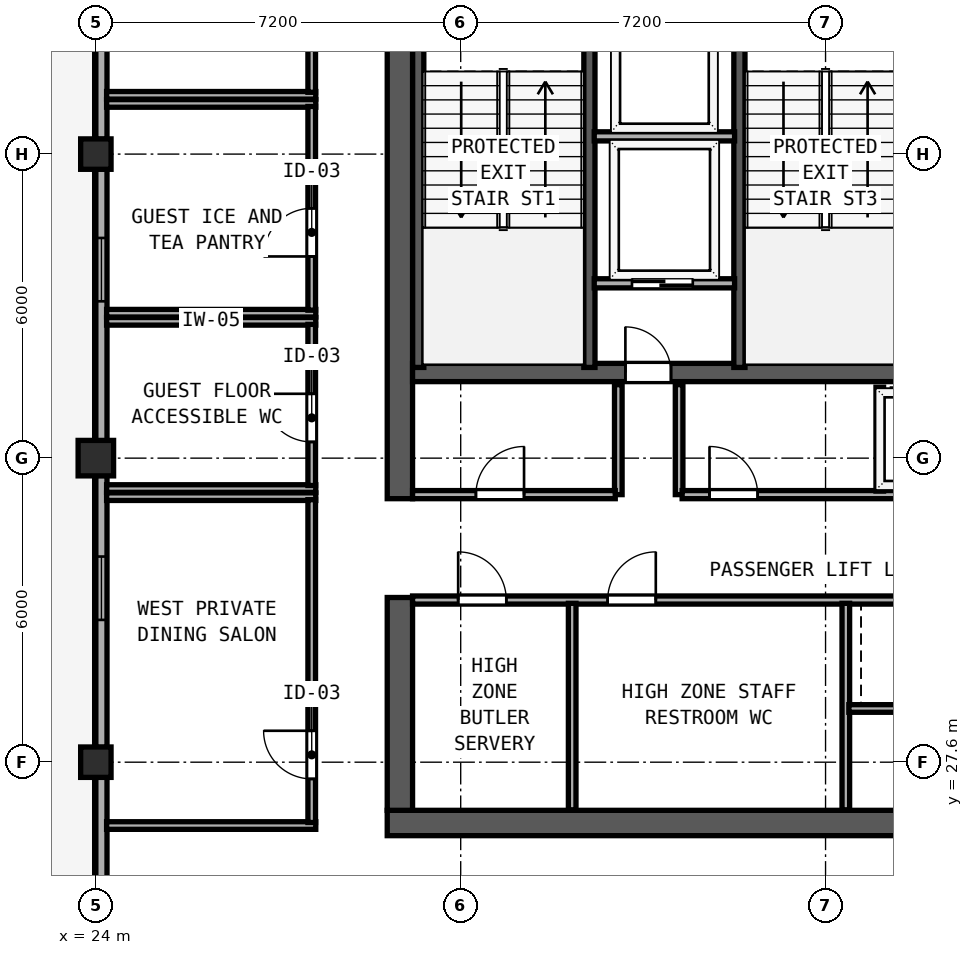
"""IFC4 building model, lengths in metres.
Left out: names, types, materials, properties, quantities, classifications, styles, units other than length and angle.
Written with IfcOpenShell. Run it as: python <this file> out.ifc"""

import sys

from ifc_helpers import new_model, si_unit, direction, frame, frame_2d, origin, origin_2d, place, context, subcontext, project, spatial, rectangle, hollow_rectangle, extrude, element, fill, save


model = new_model("IFC4")
c1 = context("Model", 3, precision=1e-05, world=origin(), true_north=direction((0.0, 1.0)))
c2 = subcontext(c1, "Body", "Model", "MODEL_VIEW")
j1 = project(units=[si_unit("LENGTHUNIT", "METRE"), si_unit("PLANEANGLEUNIT", "RADIAN")], contexts=[c1])
p1 = place(None, origin())
s1 = spatial("IfcSite", under=j1, at=p1, CompositionType="ELEMENT")
p2 = place(p1, origin())
s2 = spatial("IfcBuilding", under=s1, at=p2, CompositionType="ELEMENT")
p3 = place(p2, frame((0.0, 0.0, 282.2)))
s3 = spatial("IfcBuildingStorey", under=s2, at=p3, CompositionType="ELEMENT", Elevation=282.2)
p4 = place(p3, frame((29.75, 26.4, 0.0), z_axis=(0.0, 0.0, 1.0), x_axis=(1.0, 0.0, 0.0)))
e1 = element("IfcWall", 1, at=p4, inside=s3, PredefinedType="SHEAR", context=c2, shape_type="SweptSolid", body=[
    extrude(rectangle(XDim=17.3, YDim=0.5, at=frame_2d((8.65, 0.0))), origin(), (0.0, 0.0, 1.0), 3.72),
])
p5 = place(p3, frame((30.0, 26.65, 0.0), z_axis=(0.0, 0.0, 1.0), x_axis=(0.0, 1.0, 0.0)))
e2 = element("IfcWall", 2, at=p5, inside=s3, PredefinedType="SHEAR", context=c2, shape_type="SweptSolid", body=[
    extrude(rectangle(XDim=4.2, YDim=0.5, at=frame_2d((2.1, 0.0))), origin(), (0.0, 0.0, 1.0), 3.72),
])
p6 = place(p3, frame((30.0, 32.8, 0.0), z_axis=(0.0, 0.0, 1.0), x_axis=(0.0, 1.0, 0.0)))
e3 = element("IfcWall", 3, at=p6, inside=s3, PredefinedType="SHEAR", context=c2, shape_type="SweptSolid", body=[
    extrude(rectangle(XDim=10.15, YDim=0.5, at=frame_2d((5.075, 0.0))), origin(), (0.0, 0.0, 1.0), 3.72),
])
p7 = place(p3, frame((30.25, 35.29, 0.0), z_axis=(0.0, 0.0, 1.0), x_axis=(1.0, 0.0, 0.0)))
e4 = element("IfcWall", 4, at=p7, inside=s3, PredefinedType="SHEAR", context=c2, shape_type="SweptSolid", body=[
    extrude(rectangle(XDim=16.3, YDim=0.36, at=frame_2d((8.15, 0.0))), origin(), (0.0, 0.0, 1.0), 3.72),
])
p8 = place(p7, frame((5.1, 0.0, 0.0), z_axis=(0.0, 0.0, 1.0), x_axis=(-1.0, 0.0, 0.0)))
e5 = element("IfcOpeningElement", 5, at=p8, cuts=e4, PredefinedType="OPENING", context=c2, shape_type="SweptSolid", body=[
    extrude(rectangle(XDim=0.9, YDim=2.1, at=frame_2d((0.45, 1.05))), frame((0.0, 0.19, 0.0), z_axis=(0.0, -1.0, 0.0), x_axis=(1.0, 0.0, 0.0)), (0.0, 0.0, 1.0), 0.38),
])
p9 = place(p7, frame((12.16, 0.0, 0.0), z_axis=(0.0, 0.0, 1.0), x_axis=(-1.0, 0.0, 0.0)))
e6 = element("IfcOpeningElement", 6, at=p9, cuts=e4, PredefinedType="OPENING", context=c2, shape_type="SweptSolid", body=[
    extrude(rectangle(XDim=0.9, YDim=2.1, at=frame_2d((0.45, 1.05))), frame((0.0, 0.19, 0.0), z_axis=(0.0, -1.0, 0.0), x_axis=(1.0, 0.0, 0.0)), (0.0, 0.0, 1.0), 0.38),
])
for number, where, z_axis, x_axis in (
    (7, (30.362, 35.39, 0.0), (0.0, 0.0, 1.0), (0.0, 1.0, 0.0)),
    (8, (33.74, 35.39, 0.0), (0.0, 0.0, 1.0), (0.0, 1.0, 0.0)),
    (9, (36.7, 35.39, 0.0), (0.0, 0.0, 1.0), (0.0, 1.0, 0.0)),
):
    element("IfcWall", number, at=place(p3, frame(where, z_axis=z_axis, x_axis=x_axis)), inside=s3, PredefinedType="SHEAR", context=c2, shape_type="SweptSolid", body=[
        extrude(rectangle(XDim=7.56, YDim=0.22, at=frame_2d((3.78, 0.0))), origin(), (0.0, 0.0, 1.0), 3.72),
    ])
p10 = place(p3, frame((24.0, 33.6, 0.0), z_axis=(0.0, 0.0, 1.0), x_axis=(1.0, 0.0, 0.0)))
e10 = element("IfcColumn", 10, at=p10, inside=s3, PredefinedType="COLUMN", context=c2, shape_type="SweptSolid", body=[
    extrude(hollow_rectangle(XDim=0.7, YDim=0.7, WallThickness=0.026, at=origin_2d()), origin(), (0.0, 0.0, 1.0), 3.9),
])
for number, where, z_axis, x_axis in (
    (11, (24.0, 27.6, 0.0), (0.0, 0.0, 1.0), (1.0, 0.0, 0.0)),
    (12, (24.0, 39.6, 0.0), (0.0, 0.0, 1.0), (1.0, 0.0, 0.0)),
):
    element("IfcColumn", number, at=place(p3, frame(where, z_axis=z_axis, x_axis=x_axis)), inside=s3, PredefinedType="COLUMN", context=c2, shape_type="SweptSolid", body=[
        extrude(hollow_rectangle(XDim=0.6, YDim=0.6, WallThickness=0.024, at=origin_2d()), origin(), (0.0, 0.0, 1.0), 3.9),
    ])
p11 = place(p3, frame((24.11, 45.258, 0.0), z_axis=(0.0, 0.0, 1.0), x_axis=(0.0, -1.0, 0.0)))
e13 = element("IfcWall", 13, at=p11, inside=s3, PredefinedType="SOLIDWALL", context=c2, shape_type="SweptSolid", body=[
    extrude(rectangle(XDim=5.366, YDim=0.22, at=frame_2d((2.683, 0.0))), origin(), (0.0, 0.0, 1.0), 3.365),
])
p12 = place(p11, frame((1.6, 0.0, 0.85)))
e14 = element("IfcOpeningElement", 14, at=p12, cuts=e13, PredefinedType="OPENING", context=c2, shape_type="SweptSolid", body=[
    extrude(rectangle(XDim=1.25, YDim=1.95, at=frame_2d((0.625, 0.975))), frame((0.0, 0.12, 0.0), z_axis=(0.0, -1.0, 0.0), x_axis=(1.0, 0.0, 0.0)), (0.0, 0.0, 1.0), 0.24),
])
p13 = place(p3, frame((24.11, 39.308, 0.0), z_axis=(0.0, 0.0, 1.0), x_axis=(0.0, -1.0, 0.0)))
e15 = element("IfcWall", 15, at=p13, inside=s3, PredefinedType="SOLIDWALL", context=c2, shape_type="SweptSolid", body=[
    extrude(rectangle(XDim=5.366, YDim=0.22, at=frame_2d((2.683, 0.0))), origin(), (0.0, 0.0, 1.0), 3.365),
])
p14 = place(p13, frame((1.363, 0.0, 0.85)))
e16 = element("IfcOpeningElement", 16, at=p14, cuts=e15, PredefinedType="OPENING", context=c2, shape_type="SweptSolid", body=[
    extrude(rectangle(XDim=1.25, YDim=1.95, at=frame_2d((0.625, 0.975))), frame((0.0, 0.12, 0.0), z_axis=(0.0, -1.0, 0.0), x_axis=(1.0, 0.0, 0.0)), (0.0, 0.0, 1.0), 0.24),
])
p15 = place(p3, frame((24.11, 33.258, 0.0), z_axis=(0.0, 0.0, 1.0), x_axis=(0.0, -1.0, 0.0)))
e17 = element("IfcWall", 17, at=p15, inside=s3, PredefinedType="SOLIDWALL", context=c2, shape_type="SweptSolid", body=[
    extrude(rectangle(XDim=5.366, YDim=0.22, at=frame_2d((2.683, 0.0))), origin(), (0.0, 0.0, 1.0), 3.365),
])
p16 = place(p15, frame((1.6, 0.0, 0.85)))
e18 = element("IfcOpeningElement", 18, at=p16, cuts=e17, PredefinedType="OPENING", context=c2, shape_type="SweptSolid", body=[
    extrude(rectangle(XDim=1.25, YDim=1.95, at=frame_2d((0.625, 0.975))), frame((0.0, 0.12, 0.0), z_axis=(0.0, -1.0, 0.0), x_axis=(1.0, 0.0, 0.0)), (0.0, 0.0, 1.0), 0.24),
])
p17 = place(p3, frame((24.11, 27.308, 0.0), z_axis=(0.0, 0.0, 1.0), x_axis=(0.0, -1.0, 0.0)))
e19 = element("IfcWall", 19, at=p17, inside=s3, PredefinedType="SOLIDWALL", context=c2, shape_type="SweptSolid", body=[
    extrude(rectangle(XDim=5.366, YDim=0.22, at=frame_2d((2.683, 0.0))), origin(), (0.0, 0.0, 1.0), 3.365),
])
p18 = place(p17, frame((5.146, 0.0, 0.0), z_axis=(0.0, 0.0, 1.0), x_axis=(-1.0, 0.0, 0.0)))
e20 = element("IfcOpeningElement", 20, at=p18, cuts=e19, PredefinedType="OPENING", context=c2, shape_type="SweptSolid", body=[
    extrude(rectangle(XDim=1.5, YDim=2.2, at=frame_2d((0.75, 1.1))), frame((0.0, 0.12, 0.0), z_axis=(0.0, -1.0, 0.0), x_axis=(1.0, 0.0, 0.0)), (0.0, 0.0, 1.0), 0.24),
])
p19 = place(p3, frame((33.835, 39.95, 0.0), z_axis=(0.0, 0.0, 1.0), x_axis=(1.0, 0.0, 0.0)))
e21 = element("IfcWall", 21, at=p19, inside=s3, PredefinedType="SOLIDWALL", context=c2, shape_type="SweptSolid", body=[
    extrude(rectangle(XDim=2.77, YDim=0.18, at=frame_2d((1.385, 0.0))), origin(), (0.0, 0.0, 1.0), 3.72),
])
p20 = place(p3, frame((33.835, 37.05, 0.0), z_axis=(0.0, 0.0, 1.0), x_axis=(1.0, 0.0, 0.0)))
e22 = element("IfcWall", 22, at=p20, inside=s3, PredefinedType="SOLIDWALL", context=c2, shape_type="SweptSolid", body=[
    extrude(rectangle(XDim=2.77, YDim=0.18, at=frame_2d((1.385, 0.0))), origin(), (0.0, 0.0, 1.0), 3.72),
])
p21 = place(p20, frame((1.945, 0.0, 0.0), z_axis=(0.0, 0.0, 1.0), x_axis=(-1.0, 0.0, 0.0)))
e23 = element("IfcOpeningElement", 23, at=p21, cuts=e22, PredefinedType="OPENING", context=c2, shape_type="SweptSolid", body=[
    extrude(rectangle(XDim=1.2, YDim=2.2, at=frame_2d((0.6, 1.1))), frame((0.0, 0.1, 0.0), z_axis=(0.0, -1.0, 0.0), x_axis=(1.0, 0.0, 0.0)), (0.0, 0.0, 1.0), 0.2),
])
for number, where, z_axis, x_axis in (
    (24, (34.31, 32.88, 0.0), (0.0, 0.0, 1.0), (0.0, 1.0, 0.0)),
    (25, (35.51, 32.88, 0.0), (0.0, 0.0, 1.0), (0.0, 1.0, 0.0)),
):
    element("IfcWall", number, at=place(p3, frame(where, z_axis=z_axis, x_axis=x_axis)), inside=s3, PredefinedType="SOLIDWALL", context=c2, shape_type="SweptSolid", body=[
        extrude(rectangle(XDim=2.17, YDim=0.15, at=frame_2d((1.085, 0.0))), origin(), (0.0, 0.0, 1.0), 3.72),
    ])
p22 = place(p3, frame((30.25, 32.88, 0.0), z_axis=(0.0, 0.0, 1.0), x_axis=(1.0, 0.0, 0.0)))
e26 = element("IfcWall", 26, at=p22, inside=s3, PredefinedType="SOLIDWALL", context=c2, shape_type="SweptSolid", body=[
    extrude(rectangle(XDim=4.0, YDim=0.16, at=frame_2d((2.0, 0.0))), origin(), (0.0, 0.0, 1.0), 3.72),
])
p23 = place(p22, frame((2.2, 0.0, 0.0), z_axis=(0.0, 0.0, 1.0), x_axis=(-1.0, 0.0, 0.0)))
e27 = element("IfcOpeningElement", 27, at=p23, cuts=e26, PredefinedType="OPENING", context=c2, shape_type="SweptSolid", body=[
    extrude(rectangle(XDim=0.95, YDim=2.12, at=frame_2d((0.475, 1.06))), frame((0.0, 0.09, 0.0), z_axis=(0.0, -1.0, 0.0), x_axis=(1.0, 0.0, 0.0)), (0.0, 0.0, 1.0), 0.18),
])
p24 = place(p3, frame((35.57, 32.88, 0.0), z_axis=(0.0, 0.0, 1.0), x_axis=(1.0, 0.0, 0.0)))
e28 = element("IfcWall", 28, at=p24, inside=s3, PredefinedType="SOLIDWALL", context=c2, shape_type="SweptSolid", body=[
    extrude(rectangle(XDim=5.74, YDim=0.16, at=frame_2d((2.87, 0.0))), origin(), (0.0, 0.0, 1.0), 3.72),
])
p25 = place(p24, frame((1.49, 0.0, 0.0), z_axis=(0.0, 0.0, 1.0), x_axis=(-1.0, 0.0, 0.0)))
e29 = element("IfcOpeningElement", 29, at=p25, cuts=e28, PredefinedType="OPENING", context=c2, shape_type="SweptSolid", body=[
    extrude(rectangle(XDim=0.95, YDim=2.12, at=frame_2d((0.475, 1.06))), frame((0.0, 0.09, 0.0), z_axis=(0.0, -1.0, 0.0), x_axis=(1.0, 0.0, 0.0)), (0.0, 0.0, 1.0), 0.18),
])
p26 = place(p24, frame((5.43, 0.0, 0.0), z_axis=(0.0, 0.0, 1.0), x_axis=(-1.0, 0.0, 0.0)))
e30 = element("IfcOpeningElement", 30, at=p26, cuts=e28, PredefinedType="OPENING", context=c2, shape_type="SweptSolid", body=[
    extrude(rectangle(XDim=1.1, YDim=2.2, at=frame_2d((0.55, 1.1))), frame((0.0, 0.09, 0.0), z_axis=(0.0, -1.0, 0.0), x_axis=(1.0, 0.0, 0.0)), (0.0, 0.0, 1.0), 0.18),
])
p27 = place(p3, frame((39.47, 32.95, 0.0), z_axis=(0.0, 0.0, 1.0), x_axis=(0.0, 1.0, 0.0)))
e31 = element("IfcWall", 31, at=p27, inside=s3, PredefinedType="SOLIDWALL", context=c2, shape_type="SweptSolid", body=[
    extrude(rectangle(XDim=2.05, YDim=0.15, at=frame_2d((1.025, 0.0))), origin(), (0.0, 0.0, 1.0), 3.72),
])
p28 = place(p3, frame((30.25, 30.8, 0.0), z_axis=(0.0, 0.0, 1.0), x_axis=(1.0, 0.0, 0.0)))
e32 = element("IfcWall", 32, at=p28, inside=s3, PredefinedType="SOLIDWALL", context=c2, shape_type="SweptSolid", body=[
    extrude(rectangle(XDim=16.3, YDim=0.16, at=frame_2d((8.15, 0.0))), origin(), (0.0, 0.0, 1.0), 3.72),
])
p29 = place(p28, frame((0.9, 0.0, 0.0)))
e33 = element("IfcOpeningElement", 33, at=p29, cuts=e32, PredefinedType="OPENING", context=c2, shape_type="SweptSolid", body=[
    extrude(rectangle(XDim=0.95, YDim=2.12, at=frame_2d((0.475, 1.06))), frame((0.0, 0.09, 0.0), z_axis=(0.0, -1.0, 0.0), x_axis=(1.0, 0.0, 0.0)), (0.0, 0.0, 1.0), 0.18),
])
p30 = place(p28, frame((3.85, 0.0, 0.0)))
e34 = element("IfcOpeningElement", 34, at=p30, cuts=e32, PredefinedType="OPENING", context=c2, shape_type="SweptSolid", body=[
    extrude(rectangle(XDim=0.95, YDim=2.12, at=frame_2d((0.475, 1.06))), frame((0.0, 0.09, 0.0), z_axis=(0.0, -1.0, 0.0), x_axis=(1.0, 0.0, 0.0)), (0.0, 0.0, 1.0), 0.18),
])
p31 = place(p3, frame((38.8, 26.66, 0.0), z_axis=(0.0, 0.0, 1.0), x_axis=(0.0, 1.0, 0.0)))
e35 = element("IfcWall", 35, at=p31, inside=s3, PredefinedType="SOLIDWALL", context=c2, shape_type="SweptSolid", body=[
    extrude(rectangle(XDim=4.075, YDim=0.15, at=frame_2d((2.038, 0.0))), origin(), (0.0, 0.0, 1.0), 3.72),
])
p32 = place(p3, frame((33.4, 26.66, 0.0), z_axis=(0.0, 0.0, 1.0), x_axis=(0.0, 1.0, 0.0)))
e36 = element("IfcWall", 36, at=p32, inside=s3, PredefinedType="PARTITIONING", context=c2, shape_type="SweptSolid", body=[
    extrude(rectangle(XDim=4.075, YDim=0.15, at=frame_2d((2.038, 0.0))), origin(), (0.0, 0.0, 1.0), 3.72),
])
p33 = place(p3, frame((38.86, 28.66, 0.0), z_axis=(0.0, 0.0, 1.0), x_axis=(1.0, 0.0, 0.0)))
e37 = element("IfcWall", 37, at=p33, inside=s3, PredefinedType="PARTITIONING", context=c2, shape_type="SweptSolid", body=[
    extrude(rectangle(XDim=7.69, YDim=0.15, at=frame_2d((3.845, 0.0))), origin(), (0.0, 0.0, 1.0), 3.72),
])
for number, where, z_axis, x_axis in (
    (38, (24.212, 36.3, 0.0), (0.0, 0.0, 1.0), (1.0, 0.0, 0.0)),
    (39, (24.212, 33.0, 0.0), (0.0, 0.0, 1.0), (1.0, 0.0, 0.0)),
):
    element("IfcWall", number, at=place(p3, frame(where, z_axis=z_axis, x_axis=x_axis)), inside=s3, PredefinedType="PARTITIONING", context=c2, shape_type="SweptSolid", body=[
        extrude(rectangle(XDim=4.128, YDim=0.15, at=frame_2d((2.064, 0.0))), origin(), (0.0, 0.0, 1.0), 3.72),
    ])
p34 = place(p3, frame((28.26, 33.06, 0.0), z_axis=(0.0, 0.0, 1.0), x_axis=(0.0, 1.0, 0.0)))
e40 = element("IfcWall", 40, at=p34, inside=s3, PredefinedType="PARTITIONING", context=c2, shape_type="SweptSolid", body=[
    extrude(rectangle(XDim=3.18, YDim=0.15, at=frame_2d((1.59, 0.0))), origin(), (0.0, 0.0, 1.0), 3.72),
])
p35 = place(p34, frame((1.81, 0.0, 0.0), z_axis=(0.0, 0.0, 1.0), x_axis=(-1.0, 0.0, 0.0)))
e41 = element("IfcOpeningElement", 41, at=p35, cuts=e40, PredefinedType="OPENING", context=c2, shape_type="SweptSolid", body=[
    extrude(rectangle(XDim=0.95, YDim=2.12, at=frame_2d((0.475, 1.06))), frame((0.0, 0.085, 0.0), z_axis=(0.0, -1.0, 0.0), x_axis=(1.0, 0.0, 0.0)), (0.0, 0.0, 1.0), 0.17),
])
for number, where, z_axis, x_axis in (
    (42, (24.212, 40.6, 0.0), (0.0, 0.0, 1.0), (1.0, 0.0, 0.0)),
    (43, (24.212, 36.46, 0.0), (0.0, 0.0, 1.0), (1.0, 0.0, 0.0)),
):
    element("IfcWall", number, at=place(p3, frame(where, z_axis=z_axis, x_axis=x_axis)), inside=s3, PredefinedType="PARTITIONING", context=c2, shape_type="SweptSolid", body=[
        extrude(rectangle(XDim=4.128, YDim=0.15, at=frame_2d((2.064, 0.0))), origin(), (0.0, 0.0, 1.0), 3.72),
    ])
p36 = place(p3, frame((28.26, 36.52, 0.0), z_axis=(0.0, 0.0, 1.0), x_axis=(0.0, 1.0, 0.0)))
e44 = element("IfcWall", 44, at=p36, inside=s3, PredefinedType="PARTITIONING", context=c2, shape_type="SweptSolid", body=[
    extrude(rectangle(XDim=4.02, YDim=0.15, at=frame_2d((2.01, 0.0))), origin(), (0.0, 0.0, 1.0), 3.72),
])
p37 = place(p36, frame((2.01, 0.0, 0.0), z_axis=(0.0, 0.0, 1.0), x_axis=(-1.0, 0.0, 0.0)))
e45 = element("IfcOpeningElement", 45, at=p37, cuts=e44, PredefinedType="OPENING", context=c2, shape_type="SweptSolid", body=[
    extrude(rectangle(XDim=0.95, YDim=2.12, at=frame_2d((0.475, 1.06))), frame((0.0, 0.085, 0.0), z_axis=(0.0, -1.0, 0.0), x_axis=(1.0, 0.0, 0.0)), (0.0, 0.0, 1.0), 0.17),
])
p38 = place(p3, frame((24.212, 40.76, 0.0), z_axis=(0.0, 0.0, 1.0), x_axis=(1.0, 0.0, 0.0)))
e46 = element("IfcWall", 46, at=p38, inside=s3, PredefinedType="PARTITIONING", context=c2, shape_type="SweptSolid", body=[
    extrude(rectangle(XDim=4.128, YDim=0.15, at=frame_2d((2.064, 0.0))), origin(), (0.0, 0.0, 1.0), 3.72),
])
p39 = place(p3, frame((28.26, 40.82, 0.0), z_axis=(0.0, 0.0, 1.0), x_axis=(0.0, 1.0, 0.0)))
e47 = element("IfcWall", 47, at=p39, inside=s3, PredefinedType="PARTITIONING", context=c2, shape_type="SweptSolid", body=[
    extrude(rectangle(XDim=6.62, YDim=0.15, at=frame_2d((3.31, 0.0))), origin(), (0.0, 0.0, 1.0), 3.72),
])
p40 = place(p39, frame((2.41, 0.0, 0.0), z_axis=(0.0, 0.0, 1.0), x_axis=(-1.0, 0.0, 0.0)))
e48 = element("IfcOpeningElement", 48, at=p40, cuts=e47, PredefinedType="OPENING", context=c2, shape_type="SweptSolid", body=[
    extrude(rectangle(XDim=0.95, YDim=2.12, at=frame_2d((0.475, 1.06))), frame((0.0, 0.085, 0.0), z_axis=(0.0, -1.0, 0.0), x_axis=(1.0, 0.0, 0.0)), (0.0, 0.0, 1.0), 0.17),
])
for number, where, z_axis, x_axis in (
    (49, (24.212, 32.84, 0.0), (0.0, 0.0, 1.0), (1.0, 0.0, 0.0)),
    (50, (24.212, 26.35, 0.0), (0.0, 0.0, 1.0), (1.0, 0.0, 0.0)),
):
    element("IfcWall", number, at=place(p3, frame(where, z_axis=z_axis, x_axis=x_axis)), inside=s3, PredefinedType="PARTITIONING", context=c2, shape_type="SweptSolid", body=[
        extrude(rectangle(XDim=4.128, YDim=0.15, at=frame_2d((2.064, 0.0))), origin(), (0.0, 0.0, 1.0), 3.72),
    ])
p41 = place(p3, frame((28.26, 26.41, 0.0), z_axis=(0.0, 0.0, 1.0), x_axis=(0.0, 1.0, 0.0)))
e51 = element("IfcWall", 51, at=p41, inside=s3, PredefinedType="PARTITIONING", context=c2, shape_type="SweptSolid", body=[
    extrude(rectangle(XDim=6.37, YDim=0.15, at=frame_2d((3.185, 0.0))), origin(), (0.0, 0.0, 1.0), 3.72),
])
p42 = place(p41, frame((1.81, 0.0, 0.0), z_axis=(0.0, 0.0, 1.0), x_axis=(-1.0, 0.0, 0.0)))
e52 = element("IfcOpeningElement", 52, at=p42, cuts=e51, PredefinedType="OPENING", context=c2, shape_type="SweptSolid", body=[
    extrude(rectangle(XDim=0.95, YDim=2.12, at=frame_2d((0.475, 1.06))), frame((0.0, 0.085, 0.0), z_axis=(0.0, -1.0, 0.0), x_axis=(1.0, 0.0, 0.0)), (0.0, 0.0, 1.0), 0.17),
])
p43 = place(p14, origin())
e53 = element("IfcWindow", 53, at=p43, inside=s3, PartitioningType="SINGLE_PANEL", PredefinedType="WINDOW", context=c2, shape_type="SweptSolid", body=[
    extrude(rectangle(XDim=1.25, YDim=1.95, at=frame_2d((0.625, 0.975))), frame((0.0, 0.03, 0.0), z_axis=(0.0, -1.0, 0.0), x_axis=(1.0, 0.0, 0.0)), (0.0, 0.0, 1.0), 0.06),
])
fill(e16, e53)
p44 = place(p16, origin())
e54 = element("IfcWindow", 54, at=p44, inside=s3, PartitioningType="SINGLE_PANEL", PredefinedType="WINDOW", context=c2, shape_type="SweptSolid", body=[
    extrude(rectangle(XDim=1.25, YDim=1.95, at=frame_2d((0.625, 0.975))), frame((0.0, 0.03, 0.0), z_axis=(0.0, -1.0, 0.0), x_axis=(1.0, 0.0, 0.0)), (0.0, 0.0, 1.0), 0.06),
])
fill(e18, e54)
p45 = place(p21, origin())
e55 = element("IfcDoor", 55, at=p45, inside=s3, OperationType="SLIDING_TO_RIGHT", PredefinedType="DOOR", context=c2, shape_type="SweptSolid", body=[
    extrude(rectangle(XDim=1.2, YDim=2.2, at=frame_2d((0.6, 1.1))), frame((0.0, 0.025, 0.0), z_axis=(0.0, -1.0, 0.0), x_axis=(1.0, 0.0, 0.0)), (0.0, 0.0, 1.0), 0.05),
])
fill(e23, e55)
p46 = place(p8, origin())
e56 = element("IfcDoor", 56, at=p46, inside=s3, OperationType="SINGLE_SWING_RIGHT", PredefinedType="DOOR", context=c2, shape_type="SweptSolid", body=[
    extrude(rectangle(XDim=0.9, YDim=2.1, at=frame_2d((0.45, 1.05))), frame((0.0, 0.025, 0.0), z_axis=(0.0, -1.0, 0.0), x_axis=(1.0, 0.0, 0.0)), (0.0, 0.0, 1.0), 0.05),
])
fill(e5, e56)
p47 = place(p23, origin())
e57 = element("IfcDoor", 57, at=p47, inside=s3, OperationType="SINGLE_SWING_LEFT", PredefinedType="DOOR", context=c2, shape_type="SweptSolid", body=[
    extrude(rectangle(XDim=0.95, YDim=2.12, at=frame_2d((0.475, 1.06))), frame((0.0, 0.025, 0.0), z_axis=(0.0, -1.0, 0.0), x_axis=(1.0, 0.0, 0.0)), (0.0, 0.0, 1.0), 0.05),
])
fill(e27, e57)
p48 = place(p25, origin())
e58 = element("IfcDoor", 58, at=p48, inside=s3, OperationType="SINGLE_SWING_RIGHT", PredefinedType="DOOR", context=c2, shape_type="SweptSolid", body=[
    extrude(rectangle(XDim=0.95, YDim=2.12, at=frame_2d((0.475, 1.06))), frame((0.0, 0.025, 0.0), z_axis=(0.0, -1.0, 0.0), x_axis=(1.0, 0.0, 0.0)), (0.0, 0.0, 1.0), 0.05),
])
fill(e29, e58)
p49 = place(p29, origin())
e59 = element("IfcDoor", 59, at=p49, inside=s3, OperationType="SINGLE_SWING_LEFT", PredefinedType="DOOR", context=c2, shape_type="SweptSolid", body=[
    extrude(rectangle(XDim=0.95, YDim=2.12, at=frame_2d((0.475, 1.06))), frame((0.0, 0.025, 0.0), z_axis=(0.0, -1.0, 0.0), x_axis=(1.0, 0.0, 0.0)), (0.0, 0.0, 1.0), 0.05),
])
fill(e33, e59)
p50 = place(p30, origin())
e60 = element("IfcDoor", 60, at=p50, inside=s3, OperationType="SINGLE_SWING_RIGHT", PredefinedType="DOOR", context=c2, shape_type="SweptSolid", body=[
    extrude(rectangle(XDim=0.95, YDim=2.12, at=frame_2d((0.475, 1.06))), frame((0.0, 0.025, 0.0), z_axis=(0.0, -1.0, 0.0), x_axis=(1.0, 0.0, 0.0)), (0.0, 0.0, 1.0), 0.05),
])
fill(e34, e60)
p51 = place(p35, origin())
e61 = element("IfcDoor", 61, at=p51, inside=s3, OperationType="SINGLE_SWING_LEFT", PredefinedType="DOOR", context=c2, shape_type="SweptSolid", body=[
    extrude(rectangle(XDim=0.95, YDim=2.12, at=frame_2d((0.475, 1.06))), frame((0.0, 0.025, 0.0), z_axis=(0.0, -1.0, 0.0), x_axis=(1.0, 0.0, 0.0)), (0.0, 0.0, 1.0), 0.05),
])
fill(e41, e61)
p52 = place(p37, origin())
e62 = element("IfcDoor", 62, at=p52, inside=s3, OperationType="SINGLE_SWING_RIGHT", PredefinedType="DOOR", context=c2, shape_type="SweptSolid", body=[
    extrude(rectangle(XDim=0.95, YDim=2.12, at=frame_2d((0.475, 1.06))), frame((0.0, 0.025, 0.0), z_axis=(0.0, -1.0, 0.0), x_axis=(1.0, 0.0, 0.0)), (0.0, 0.0, 1.0), 0.05),
])
fill(e45, e62)
p53 = place(p42, origin())
e63 = element("IfcDoor", 63, at=p53, inside=s3, OperationType="SINGLE_SWING_LEFT", PredefinedType="DOOR", context=c2, shape_type="SweptSolid", body=[
    extrude(rectangle(XDim=0.95, YDim=2.12, at=frame_2d((0.475, 1.06))), frame((0.0, 0.025, 0.0), z_axis=(0.0, -1.0, 0.0), x_axis=(1.0, 0.0, 0.0)), (0.0, 0.0, 1.0), 0.05),
])
fill(e52, e63)
save(model, sys.argv[1])
